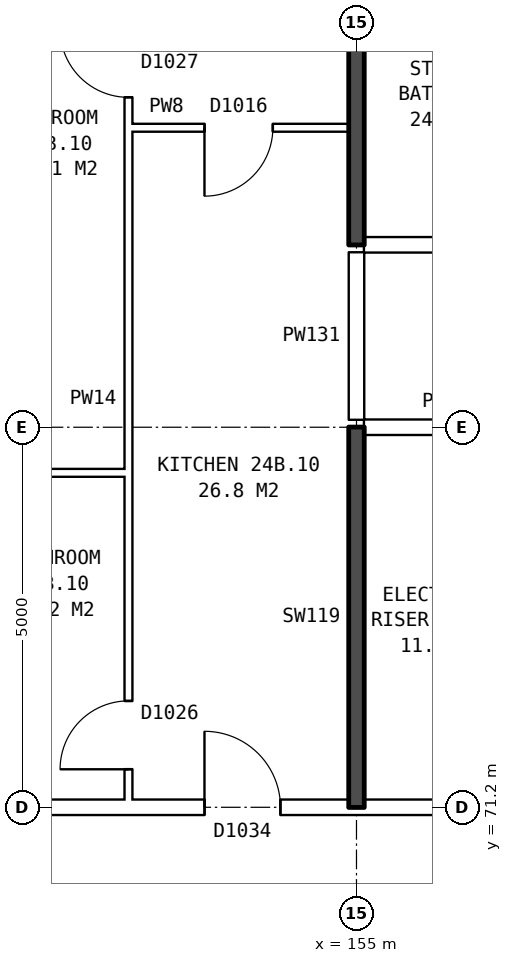
"""IFC4 building model, lengths in metres.
Left out: names, types, materials, properties, quantities, classifications, styles, units other than length and angle.
Written with IfcOpenShell. Run it as: python <this file> out.ifc"""

import sys

from ifc_helpers import new_model, si_unit, direction, frame, frame_2d, origin, place, context, subcontext, project, spatial, rectangle, extrude, element, fill, save


model = new_model("IFC4")
c1 = context("Model", 3, precision=1e-05, world=origin(), true_north=direction((0.0, 1.0)))
c2 = subcontext(c1, "Body", "Model", "MODEL_VIEW")
j1 = project(units=[si_unit("LENGTHUNIT", "METRE"), si_unit("PLANEANGLEUNIT", "RADIAN")], contexts=[c1])
p1 = place(None, origin())
s1 = spatial("IfcSite", under=j1, at=p1, CompositionType="ELEMENT")
p2 = place(p1, origin())
s2 = spatial("IfcBuilding", under=s1, at=p2, CompositionType="ELEMENT")
p3 = place(p2, frame((0.0, 0.0, 87.1)))
s3 = spatial("IfcBuildingStorey", under=s2, at=p3, CompositionType="ELEMENT", Elevation=87.1)
p4 = place(p3, frame((142.76, 71.2, 0.0), z_axis=(0.0, 0.0, 1.0), x_axis=(1.0, 0.0, 0.0)))
e1 = element("IfcWall", 1, at=p4, inside=s3, PredefinedType="PARTITIONING", context=c2, shape_type="SweptSolid", body=[
    extrude(rectangle(XDim=14.48, YDim=0.2, at=frame_2d((7.24, 0.0))), origin(), (0.0, 0.0, 1.0), 2.85),
])
p5 = place(p4, frame((1.12, 0.0, 0.0)))
e2 = element("IfcOpeningElement", 2, at=p5, cuts=e1, PredefinedType="OPENING", context=c2, shape_type="SweptSolid", body=[
    extrude(rectangle(XDim=1.0, YDim=2.1, at=frame_2d((0.5, 1.05))), frame((0.0, 0.11, 0.0), z_axis=(0.0, -1.0, 0.0), x_axis=(1.0, 0.0, 0.0)), (0.0, 0.0, 1.0), 0.22),
])
p6 = place(p4, frame((10.24, 0.0, 0.0)))
e3 = element("IfcOpeningElement", 3, at=p6, cuts=e1, PredefinedType="OPENING", context=c2, shape_type="SweptSolid", body=[
    extrude(rectangle(XDim=1.0, YDim=2.1, at=frame_2d((0.5, 1.05))), frame((0.0, 0.11, 0.0), z_axis=(0.0, -1.0, 0.0), x_axis=(1.0, 0.0, 0.0)), (0.0, 0.0, 1.0), 0.22),
])
p7 = place(p3, frame((146.0, 75.6, 0.0), z_axis=(0.0, 0.0, 1.0), x_axis=(1.0, 0.0, 0.0)))
e4 = element("IfcWall", 4, at=p7, inside=s3, PredefinedType="PARTITIONING", context=c2, shape_type="SweptSolid", body=[
    extrude(rectangle(XDim=6.0, YDim=0.1, at=frame_2d((3.0, 0.0))), origin(), (0.0, 0.0, 1.0), 2.85),
])
p8 = place(p3, frame((155.1, 76.2, 0.0), z_axis=(0.0, 0.0, 1.0), x_axis=(1.0, 0.0, 0.0)))
e5 = element("IfcWall", 5, at=p8, inside=s3, PredefinedType="PARTITIONING", context=c2, shape_type="SweptSolid", body=[
    extrude(rectangle(XDim=2.14, YDim=0.2, at=frame_2d((1.07, 0.0))), origin(), (0.0, 0.0, 1.0), 2.85),
])
p9 = place(p3, frame((155.1, 78.6, 0.0), z_axis=(0.0, 0.0, 1.0), x_axis=(1.0, 0.0, 0.0)))
e6 = element("IfcWall", 6, at=p9, inside=s3, PredefinedType="PARTITIONING", context=c2, shape_type="SweptSolid", body=[
    extrude(rectangle(XDim=19.79, YDim=0.2, at=frame_2d((9.895, 0.0))), origin(), (0.0, 0.0, 1.0), 2.85),
])
p10 = place(p9, frame((3.6, 0.0, 0.0)))
e7 = element("IfcOpeningElement", 7, at=p10, cuts=e6, PredefinedType="OPENING", context=c2, shape_type="SweptSolid", body=[
    extrude(rectangle(XDim=1.0, YDim=2.1, at=frame_2d((0.5, 1.05))), frame((0.0, 0.11, 0.0), z_axis=(0.0, -1.0, 0.0), x_axis=(1.0, 0.0, 0.0)), (0.0, 0.0, 1.0), 0.22),
])
p11 = place(p9, frame((7.4, 0.0, 0.0)))
e8 = element("IfcOpeningElement", 8, at=p11, cuts=e6, PredefinedType="OPENING", context=c2, shape_type="SweptSolid", body=[
    extrude(rectangle(XDim=1.0, YDim=2.1, at=frame_2d((0.5, 1.05))), frame((0.0, 0.11, 0.0), z_axis=(0.0, -1.0, 0.0), x_axis=(1.0, 0.0, 0.0)), (0.0, 0.0, 1.0), 0.22),
])
p12 = place(p9, frame((16.545, 0.0, 0.0)))
e9 = element("IfcOpeningElement", 9, at=p12, cuts=e6, PredefinedType="OPENING", context=c2, shape_type="SweptSolid", body=[
    extrude(rectangle(XDim=1.0, YDim=2.1, at=frame_2d((0.5, 1.05))), frame((0.0, 0.11, 0.0), z_axis=(0.0, -1.0, 0.0), x_axis=(1.0, 0.0, 0.0)), (0.0, 0.0, 1.0), 0.22),
])
p13 = place(p3, frame((152.0, 80.14, 0.0), z_axis=(0.0, 0.0, 1.0), x_axis=(1.0, 0.0, 0.0)))
e10 = element("IfcWall", 10, at=p13, inside=s3, PredefinedType="PARTITIONING", context=c2, shape_type="SweptSolid", body=[
    extrude(rectangle(XDim=2.9, YDim=0.1, at=frame_2d((1.45, 0.0))), origin(), (0.0, 0.0, 1.0), 2.85),
])
p14 = place(p13, frame((1.0, 0.0, 0.0)))
e11 = element("IfcOpeningElement", 11, at=p14, cuts=e10, PredefinedType="OPENING", context=c2, shape_type="SweptSolid", body=[
    extrude(rectangle(XDim=0.9, YDim=2.1, at=frame_2d((0.45, 1.05))), frame((0.0, 0.06, 0.0), z_axis=(0.0, -1.0, 0.0), x_axis=(1.0, 0.0, 0.0)), (0.0, 0.0, 1.0), 0.12),
])
p15 = place(p3, frame((152.0, 71.3, 0.0), z_axis=(0.0, 0.0, 1.0), x_axis=(0.0, 1.0, 0.0)))
e12 = element("IfcWall", 12, at=p15, inside=s3, PredefinedType="PARTITIONING", context=c2, shape_type="SweptSolid", body=[
    extrude(rectangle(XDim=14.34, YDim=0.1, at=frame_2d((7.17, 0.0))), origin(), (0.0, 0.0, 1.0), 2.85),
])
p16 = place(p15, frame((9.24, 0.0, 0.0)))
e13 = element("IfcOpeningElement", 13, at=p16, cuts=e12, PredefinedType="OPENING", context=c2, shape_type="SweptSolid", body=[
    extrude(rectangle(XDim=0.9, YDim=2.1, at=frame_2d((0.45, 1.05))), frame((0.0, 0.06, 0.0), z_axis=(0.0, -1.0, 0.0), x_axis=(1.0, 0.0, 0.0)), (0.0, 0.0, 1.0), 0.12),
])
p17 = place(p15, frame((0.4, 0.0, 0.0)))
e14 = element("IfcOpeningElement", 14, at=p17, cuts=e12, PredefinedType="OPENING", context=c2, shape_type="SweptSolid", body=[
    extrude(rectangle(XDim=0.9, YDim=2.1, at=frame_2d((0.45, 1.05))), frame((0.0, 0.06, 0.0), z_axis=(0.0, -1.0, 0.0), x_axis=(1.0, 0.0, 0.0)), (0.0, 0.0, 1.0), 0.12),
])
p18 = place(p3, frame((155.0, 71.2, 0.0), z_axis=(0.0, 0.0, 1.0), x_axis=(0.0, 1.0, 0.0)))
e15 = element("IfcWall", 15, at=p18, inside=s3, PredefinedType="SOLIDWALL", context=c2, shape_type="SweptSolid", body=[
    extrude(rectangle(XDim=5.0, YDim=0.2, at=frame_2d((2.5, 0.0))), origin(), (0.0, 0.0, 1.0), 2.85),
])
p19 = place(p3, frame((155.0, 76.3, 0.0), z_axis=(0.0, 0.0, 1.0), x_axis=(0.0, 1.0, 0.0)))
e16 = element("IfcWall", 16, at=p19, inside=s3, PredefinedType="PARTITIONING", context=c2, shape_type="SweptSolid", body=[
    extrude(rectangle(XDim=2.2, YDim=0.2, at=frame_2d((1.1, 0.0))), origin(), (0.0, 0.0, 1.0), 2.85),
])
p20 = place(p3, frame((155.0, 78.6, 0.0), z_axis=(0.0, 0.0, 1.0), x_axis=(0.0, 1.0, 0.0)))
e17 = element("IfcWall", 17, at=p20, inside=s3, PredefinedType="SOLIDWALL", context=c2, shape_type="SweptSolid", body=[
    extrude(rectangle(XDim=7.04, YDim=0.2, at=frame_2d((3.52, 0.0))), origin(), (0.0, 0.0, 1.0), 2.85),
])
p21 = place(p16, origin())
e18 = element("IfcDoor", 18, at=p21, inside=s3, OperationType="SINGLE_SWING_RIGHT", PredefinedType="DOOR", context=c2, shape_type="SweptSolid", body=[
    extrude(rectangle(XDim=0.9, YDim=2.1, at=frame_2d((0.45, 1.05))), frame((0.0, 0.025, 0.0), z_axis=(0.0, -1.0, 0.0), x_axis=(1.0, 0.0, 0.0)), (0.0, 0.0, 1.0), 0.05),
])
fill(e13, e18)
p22 = place(p6, origin())
e19 = element("IfcDoor", 19, at=p22, inside=s3, OperationType="SINGLE_SWING_LEFT", PredefinedType="DOOR", context=c2, shape_type="SweptSolid", body=[
    extrude(rectangle(XDim=1.0, YDim=2.1, at=frame_2d((0.5, 1.05))), frame((0.0, 0.025, 0.0), z_axis=(0.0, -1.0, 0.0), x_axis=(1.0, 0.0, 0.0)), (0.0, 0.0, 1.0), 0.05),
])
fill(e3, e19)
p23 = place(p14, frame((0.9, 0.0, 0.0), z_axis=(0.0, 0.0, 1.0), x_axis=(-1.0, 0.0, 0.0)))
e20 = element("IfcDoor", 20, at=p23, inside=s3, OperationType="SINGLE_SWING_RIGHT", PredefinedType="DOOR", context=c2, shape_type="SweptSolid", body=[
    extrude(rectangle(XDim=0.9, YDim=2.1, at=frame_2d((0.45, 1.05))), frame((0.0, 0.025, 0.0), z_axis=(0.0, -1.0, 0.0), x_axis=(1.0, 0.0, 0.0)), (0.0, 0.0, 1.0), 0.05),
])
fill(e11, e20)
p24 = place(p17, origin())
e21 = element("IfcDoor", 21, at=p24, inside=s3, OperationType="SINGLE_SWING_LEFT", PredefinedType="DOOR", context=c2, shape_type="SweptSolid", body=[
    extrude(rectangle(XDim=0.9, YDim=2.1, at=frame_2d((0.45, 1.05))), frame((0.0, 0.025, 0.0), z_axis=(0.0, -1.0, 0.0), x_axis=(1.0, 0.0, 0.0)), (0.0, 0.0, 1.0), 0.05),
])
fill(e14, e21)
save(model, sys.argv[1])
